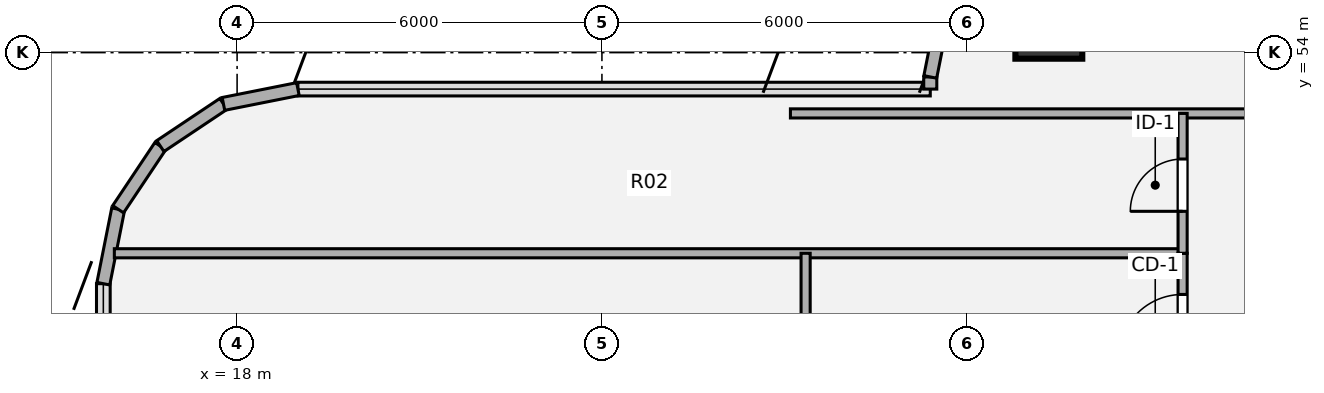
"""IFC4 building model, lengths in metres.
Left out: names, types, materials, properties, quantities, classifications, styles, units other than length and angle.
Written with IfcOpenShell. Run it as: python <this file> out.ifc"""

import sys

from ifc_helpers import new_model, si_unit, direction, frame, frame_2d, origin, origin_2d, place, context, subcontext, project, spatial, rectangle, hollow_circle, extrude, source, transform, mapped, element, fill, save


model = new_model("IFC4")
c1 = context("Model", 3, precision=1e-05, world=origin(), true_north=direction((0.0, 1.0)))
c2 = subcontext(c1, "Body", "Model", "MODEL_VIEW")
j1 = project(units=[si_unit("LENGTHUNIT", "METRE"), si_unit("PLANEANGLEUNIT", "RADIAN")], contexts=[c1])
p1 = place(None, origin())
s1 = spatial("IfcSite", under=j1, at=p1, CompositionType="ELEMENT")
p2 = place(p1, origin())
s2 = spatial("IfcBuilding", under=s1, at=p2, CompositionType="ELEMENT")
p3 = place(p2, frame((0.0, 0.0, 198.0)))
s3 = spatial("IfcBuildingStorey", under=s2, at=p3, CompositionType="ELEMENT", Elevation=198.0)
m1 = source(origin(), c2, "Body", "SweptSolid", [
    extrude(hollow_circle(Radius=0.55, WallThickness=0.04, at=origin_2d()), origin(), (0.0, 0.0, 1.0), 3.78),
])
p4 = place(p3, frame((31.35, 54.45, 0.0), z_axis=(0.0, 0.0, 1.0), x_axis=(1.0, 0.0, 0.0)))
e1 = element("IfcColumn", 1, at=p4, inside=s3, PredefinedType="COLUMN", context=c2, shape_type="MappedRepresentation", body=[
    mapped(m1, transform((0.0, 0.0, 0.0), x_axis=(1.0, 0.0, 0.0), y_axis=(0.0, 1.0, 0.0), z_axis=(0.0, 0.0, 1.0), scale=1.0)),
])
for number, where, z_axis, x_axis in (
    (2, (15.8, 50.2, 0.0), (0.0, 0.0, 1.0), (0.195, 0.981, 0.0)),
    (3, (16.044, 51.425, 0.0), (0.0, 0.0, 1.0), (0.556, 0.831, 0.0)),
    (4, (16.737, 52.463, 0.0), (0.0, 0.0, 1.0), (0.831, 0.556, 0.0)),
    (5, (17.775, 53.156, 0.0), (0.0, 0.0, 1.0), (0.981, 0.195, 0.0)),
):
    element("IfcWall", number, at=place(p3, frame(where, z_axis=z_axis, x_axis=x_axis)), inside=s3, PredefinedType="SOLIDWALL", context=c2, shape_type="SweptSolid", body=[
        extrude(rectangle(XDim=1.249, YDim=0.215, at=frame_2d((0.624, 0.0))), origin(), (0.0, 0.0, 1.0), 3.53),
    ])
p5 = place(p3, frame((29.4, 53.4, 0.0), z_axis=(0.0, 0.0, 1.0), x_axis=(0.0, 1.0, 0.0)))
e6 = element("IfcWall", 6, at=p5, inside=s3, PredefinedType="SOLIDWALL", context=c2, shape_type="SweptSolid", body=[
    extrude(rectangle(XDim=0.2, YDim=0.215, at=frame_2d((0.1, 0.0))), origin(), (0.0, 0.0, 1.0), 3.53),
])
p6 = place(p3, frame((29.4, 53.6, 0.0), z_axis=(0.0, 0.0, 1.0), x_axis=(0.195127417394, 0.980777900945, 0.0)))
e7 = element("IfcWall", 7, at=p6, inside=s3, PredefinedType="SOLIDWALL", context=c2, shape_type="SweptSolid", body=[
    extrude(rectangle(XDim=1.092, YDim=0.215, at=frame_2d((0.546, 0.0))), origin(), (0.0, 0.0, 1.0), 3.53),
])
p7 = place(p3, frame((15.981, 50.7, 0.0), z_axis=(0.0, 0.0, 1.0), x_axis=(1.0, 0.0, 0.0)))
e8 = element("IfcWall", 8, at=p7, inside=s3, PredefinedType="PARTITIONING", context=c2, shape_type="SweptSolid", body=[
    extrude(rectangle(XDim=17.569, YDim=0.15, at=frame_2d((8.785, 0.0))), origin(), (0.0, 0.0, 1.0), 3.308),
])
p8 = place(p3, frame((27.1, 53.0, 0.0), z_axis=(0.0, 0.0, 1.0), x_axis=(1.0, 0.0, 0.0)))
e9 = element("IfcWall", 9, at=p8, inside=s3, PredefinedType="PARTITIONING", context=c2, shape_type="SweptSolid", body=[
    extrude(rectangle(XDim=17.8, YDim=0.15, at=frame_2d((8.9, 0.0))), origin(), (0.0, 0.0, 1.0), 3.308),
])
p9 = place(p8, frame((8.375, 0.0, 0.0)))
e10 = element("IfcOpeningElement", 10, at=p9, cuts=e9, PredefinedType="OPENING", context=c2, shape_type="SweptSolid", body=[
    extrude(rectangle(XDim=1.05, YDim=2.1, at=origin_2d()), frame((0.525, 0.085, 1.05), z_axis=(0.0, -1.0, 0.0), x_axis=(1.0, 0.0, 0.0)), (0.0, 0.0, 1.0), 0.17),
])
p10 = place(p3, frame((27.35, 46.537, 0.0), z_axis=(0.0, 0.0, 1.0), x_axis=(0.0, 1.0, 0.0)))
e11 = element("IfcWall", 11, at=p10, inside=s3, PredefinedType="PARTITIONING", context=c2, shape_type="SweptSolid", body=[
    extrude(rectangle(XDim=4.163, YDim=0.15, at=frame_2d((2.082, 0.0))), origin(), (0.0, 0.0, 1.0), 3.5),
])
p11 = place(p10, frame((1.503, 0.0, 0.0)))
e12 = element("IfcOpeningElement", 12, at=p11, cuts=e11, PredefinedType="OPENING", context=c2, shape_type="SweptSolid", body=[
    extrude(rectangle(XDim=0.86, YDim=2.1, at=origin_2d()), frame((0.43, 0.085, 1.05), z_axis=(0.0, -1.0, 0.0), x_axis=(1.0, 0.0, 0.0)), (0.0, 0.0, 1.0), 0.17),
])
p12 = place(p3, frame((33.55, 48.285, 0.0), z_axis=(0.0, 0.0, 1.0), x_axis=(0.0, 1.0, 0.0)))
e13 = element("IfcWall", 13, at=p12, inside=s3, PredefinedType="PARTITIONING", context=c2, shape_type="SweptSolid", body=[
    extrude(rectangle(XDim=2.415, YDim=0.15, at=frame_2d((1.208, 0.0))), origin(), (0.0, 0.0, 1.0), 3.5),
])
p13 = place(p12, frame((0.688, 0.0, 0.0)))
e14 = element("IfcOpeningElement", 14, at=p13, cuts=e13, PredefinedType="OPENING", context=c2, shape_type="SweptSolid", body=[
    extrude(rectangle(XDim=1.05, YDim=2.1, at=origin_2d()), frame((0.525, 0.085, 1.05), z_axis=(0.0, -1.0, 0.0), x_axis=(1.0, 0.0, 0.0)), (0.0, 0.0, 1.0), 0.17),
])
p14 = place(p3, frame((33.55, 50.7, 0.0), z_axis=(0.0, 0.0, 1.0), x_axis=(0.0, 1.0, 0.0)))
e15 = element("IfcWall", 15, at=p14, inside=s3, PredefinedType="PARTITIONING", context=c2, shape_type="SweptSolid", body=[
    extrude(rectangle(XDim=2.3, YDim=0.15, at=frame_2d((1.15, 0.0))), origin(), (0.0, 0.0, 1.0), 3.5),
])
p15 = place(p14, frame((0.69, 0.0, 0.0)))
e16 = element("IfcOpeningElement", 16, at=p15, cuts=e15, PredefinedType="OPENING", context=c2, shape_type="SweptSolid", body=[
    extrude(rectangle(XDim=0.86, YDim=2.1, at=origin_2d()), frame((0.43, 0.085, 1.05), z_axis=(0.0, -1.0, 0.0), x_axis=(1.0, 0.0, 0.0)), (0.0, 0.0, 1.0), 0.17),
])
m2 = source(origin(), c2, "Body", "SweptSolid", [
    extrude(rectangle(XDim=1.05, YDim=2.1, at=origin_2d()), frame((0.525, 0.025, 1.05), z_axis=(0.0, -1.0, 0.0), x_axis=(1.0, 0.0, 0.0)), (0.0, 0.0, 1.0), 0.05),
])
p16 = place(p13, origin())
e17 = element("IfcDoor", 17, at=p16, inside=s3, OperationType="SINGLE_SWING_LEFT", PredefinedType="DOOR", context=c2, shape_type="MappedRepresentation", body=[
    mapped(m2, transform((0.0, 0.0, 0.0), x_axis=(1.0, 0.0, 0.0), y_axis=(0.0, 1.0, 0.0), z_axis=(0.0, 0.0, 1.0), scale=1.0)),
])
fill(e14, e17)
m3 = source(origin(), c2, "Body", "SweptSolid", [
    extrude(rectangle(XDim=0.86, YDim=2.1, at=origin_2d()), frame((0.43, 0.025, 1.05), z_axis=(0.0, -1.0, 0.0), x_axis=(1.0, 0.0, 0.0)), (0.0, 0.0, 1.0), 0.05),
])
p17 = place(p15, origin())
e18 = element("IfcDoor", 18, at=p17, inside=s3, OperationType="SINGLE_SWING_LEFT", PredefinedType="DOOR", context=c2, shape_type="MappedRepresentation", body=[
    mapped(m3, transform((0.0, 0.0, 0.0), x_axis=(1.0, 0.0, 0.0), y_axis=(0.0, 1.0, 0.0), z_axis=(0.0, 0.0, 1.0), scale=1.0)),
])
fill(e16, e18)
save(model, sys.argv[1])
